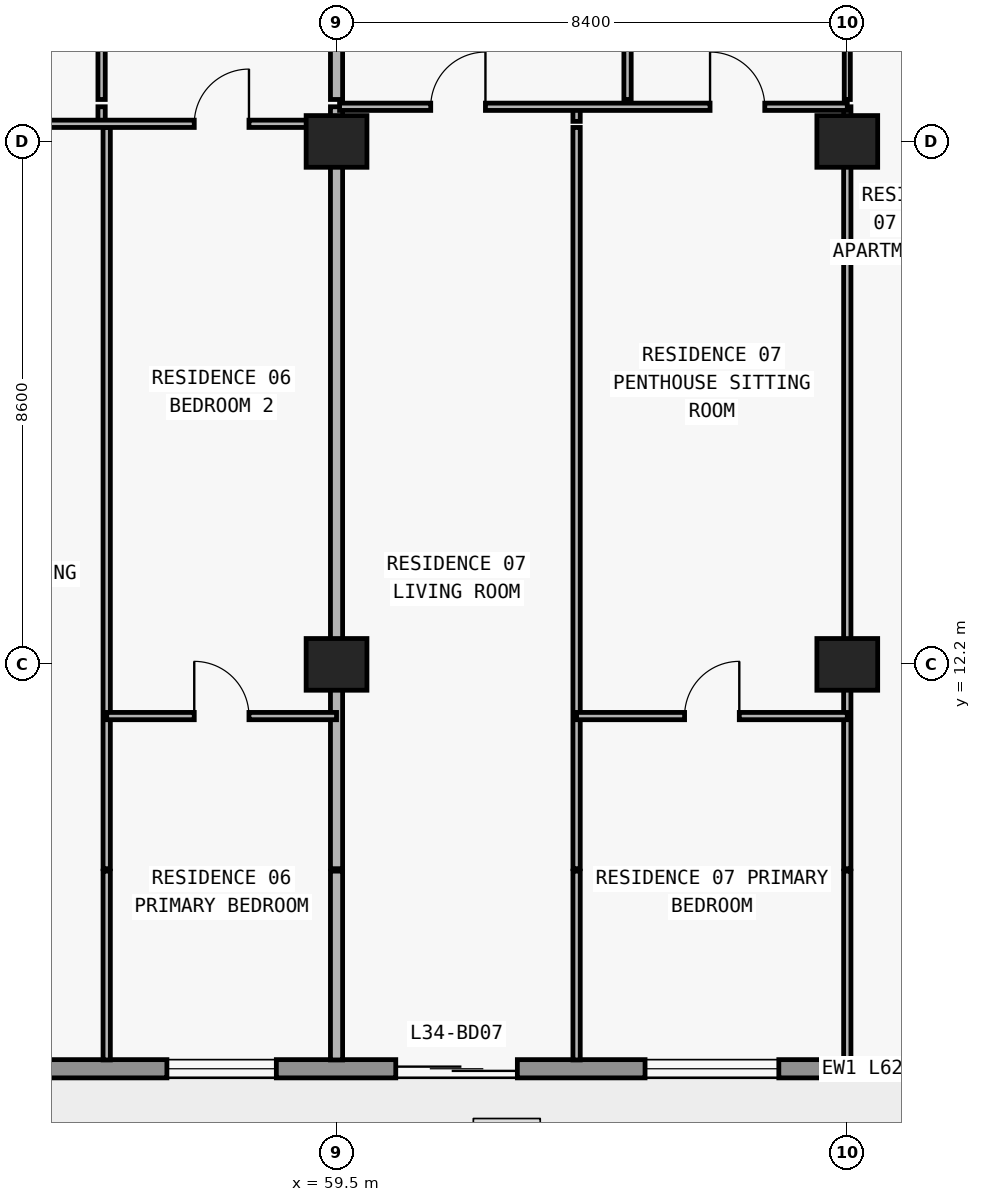
"""IFC4 building model, lengths in metres.
Left out: names, types, materials, properties, quantities, classifications, styles, units other than length and angle.
Written with IfcOpenShell. Run it as: python <this file> out.ifc"""

import sys

from ifc_helpers import new_model, si_unit, direction, frame, frame_2d, origin, origin_2d, place, context, subcontext, project, spatial, rectangle, extrude, element, fill, save


model = new_model("IFC4")
c1 = context("Model", 3, precision=1e-05, world=origin(), true_north=direction((0.0, 1.0)))
c2 = subcontext(c1, "Body", "Model", "MODEL_VIEW")
j1 = project(units=[si_unit("LENGTHUNIT", "METRE"), si_unit("PLANEANGLEUNIT", "RADIAN")], contexts=[c1])
p1 = place(None, origin())
s1 = spatial("IfcSite", under=j1, at=p1, CompositionType="ELEMENT")
p2 = place(p1, origin())
s2 = spatial("IfcBuilding", under=s1, at=p2, CompositionType="ELEMENT")
p3 = place(p2, frame((0.0, 0.0, 125.7)))
s3 = spatial("IfcBuildingStorey", under=s2, at=p3, CompositionType="ELEMENT", Elevation=125.7)
for number, where, z_axis, x_axis in (
    (1, (59.5, 12.2, 0.0), (0.0, 0.0, 1.0), (1.0, 0.0, 0.0)),
    (2, (67.9, 12.2, 0.0), (0.0, 0.0, 1.0), (1.0, 0.0, 0.0)),
    (3, (59.5, 20.8, 0.0), (0.0, 0.0, 1.0), (1.0, 0.0, 0.0)),
    (4, (67.9, 20.8, 0.0), (0.0, 0.0, 1.0), (1.0, 0.0, 0.0)),
):
    element("IfcColumn", number, at=place(p3, frame(where, z_axis=z_axis, x_axis=x_axis)), inside=s3, PredefinedType="COLUMN", context=c2, shape_type="SweptSolid", body=[
        extrude(rectangle(XDim=1.0, YDim=0.85, at=origin_2d()), origin(), (0.0, 0.0, 1.0), 3.05),
    ])
p4 = place(p3, frame((70.1, 5.55, 0.0), z_axis=(0.0, 0.0, 1.0), x_axis=(-1.0, 0.0, 0.0)))
e5 = element("IfcWall", 5, at=p4, inside=s3, PredefinedType="STANDARD", context=c2, shape_type="SweptSolid", body=[
    extrude(rectangle(XDim=62.4, YDim=0.3, at=frame_2d((31.2, 0.0))), origin(), (0.0, 0.0, 1.0), 3.05),
])
p5 = place(p4, frame((57.226, 0.0, 0.0)))
e6 = element("IfcOpeningElement", 6, at=p5, cuts=e5, PredefinedType="OPENING", context=c2, shape_type="SweptSolid", body=[
    extrude(rectangle(XDim=2.0, YDim=2.3, at=frame_2d((1.0, 1.15))), frame((0.0, 0.16, 0.0), z_axis=(0.0, -1.0, 0.0), x_axis=(1.0, 0.0, 0.0)), (0.0, 0.0, 1.0), 0.32),
])
p6 = place(p4, frame((52.926, 0.0, 0.85)))
e7 = element("IfcOpeningElement", 7, at=p6, cuts=e5, PredefinedType="OPENING", context=c2, shape_type="SweptSolid", body=[
    extrude(rectangle(XDim=2.2, YDim=1.55, at=frame_2d((1.1, 0.775))), frame((0.0, 0.16, 0.0), z_axis=(0.0, -1.0, 0.0), x_axis=(1.0, 0.0, 0.0)), (0.0, 0.0, 1.0), 0.32),
])
p7 = place(p4, frame((48.49, 0.0, 0.0)))
e8 = element("IfcOpeningElement", 8, at=p7, cuts=e5, PredefinedType="OPENING", context=c2, shape_type="SweptSolid", body=[
    extrude(rectangle(XDim=2.0, YDim=2.3, at=frame_2d((1.0, 1.15))), frame((0.0, 0.16, 0.0), z_axis=(0.0, -1.0, 0.0), x_axis=(1.0, 0.0, 0.0)), (0.0, 0.0, 1.0), 0.32),
])
p8 = place(p4, frame((44.39, 0.0, 0.85)))
e9 = element("IfcOpeningElement", 9, at=p8, cuts=e5, PredefinedType="OPENING", context=c2, shape_type="SweptSolid", body=[
    extrude(rectangle(XDim=1.8, YDim=1.55, at=frame_2d((0.9, 0.775))), frame((0.0, 0.16, 0.0), z_axis=(0.0, -1.0, 0.0), x_axis=(1.0, 0.0, 0.0)), (0.0, 0.0, 1.0), 0.32),
])
p9 = place(p4, frame((40.426, 0.0, 0.0)))
e10 = element("IfcOpeningElement", 10, at=p9, cuts=e5, PredefinedType="OPENING", context=c2, shape_type="SweptSolid", body=[
    extrude(rectangle(XDim=2.0, YDim=2.3, at=frame_2d((1.0, 1.15))), frame((0.0, 0.16, 0.0), z_axis=(0.0, -1.0, 0.0), x_axis=(1.0, 0.0, 0.0)), (0.0, 0.0, 1.0), 0.32),
])
p10 = place(p4, frame((36.126, 0.0, 0.85)))
e11 = element("IfcOpeningElement", 11, at=p10, cuts=e5, PredefinedType="OPENING", context=c2, shape_type="SweptSolid", body=[
    extrude(rectangle(XDim=2.2, YDim=1.55, at=frame_2d((1.1, 0.775))), frame((0.0, 0.16, 0.0), z_axis=(0.0, -1.0, 0.0), x_axis=(1.0, 0.0, 0.0)), (0.0, 0.0, 1.0), 0.32),
])
p11 = place(p4, frame((31.91, 0.0, 0.0)))
e12 = element("IfcOpeningElement", 12, at=p11, cuts=e5, PredefinedType="OPENING", context=c2, shape_type="SweptSolid", body=[
    extrude(rectangle(XDim=2.0, YDim=2.3, at=frame_2d((1.0, 1.15))), frame((0.0, 0.16, 0.0), z_axis=(0.0, -1.0, 0.0), x_axis=(1.0, 0.0, 0.0)), (0.0, 0.0, 1.0), 0.32),
])
p12 = place(p4, frame((28.21, 0.0, 0.85)))
e13 = element("IfcOpeningElement", 13, at=p12, cuts=e5, PredefinedType="OPENING", context=c2, shape_type="SweptSolid", body=[
    extrude(rectangle(XDim=1.8, YDim=1.55, at=frame_2d((0.9, 0.775))), frame((0.0, 0.16, 0.0), z_axis=(0.0, -1.0, 0.0), x_axis=(1.0, 0.0, 0.0)), (0.0, 0.0, 1.0), 0.32),
])
p13 = place(p4, frame((24.426, 0.0, 0.0)))
e14 = element("IfcOpeningElement", 14, at=p13, cuts=e5, PredefinedType="OPENING", context=c2, shape_type="SweptSolid", body=[
    extrude(rectangle(XDim=2.0, YDim=2.3, at=frame_2d((1.0, 1.15))), frame((0.0, 0.16, 0.0), z_axis=(0.0, -1.0, 0.0), x_axis=(1.0, 0.0, 0.0)), (0.0, 0.0, 1.0), 0.32),
])
p14 = place(p4, frame((20.126, 0.0, 0.85)))
e15 = element("IfcOpeningElement", 15, at=p14, cuts=e5, PredefinedType="OPENING", context=c2, shape_type="SweptSolid", body=[
    extrude(rectangle(XDim=2.2, YDim=1.55, at=frame_2d((1.1, 0.775))), frame((0.0, 0.16, 0.0), z_axis=(0.0, -1.0, 0.0), x_axis=(1.0, 0.0, 0.0)), (0.0, 0.0, 1.0), 0.32),
])
p15 = place(p4, frame((15.69, 0.0, 0.0)))
e16 = element("IfcOpeningElement", 16, at=p15, cuts=e5, PredefinedType="OPENING", context=c2, shape_type="SweptSolid", body=[
    extrude(rectangle(XDim=2.0, YDim=2.3, at=frame_2d((1.0, 1.15))), frame((0.0, 0.16, 0.0), z_axis=(0.0, -1.0, 0.0), x_axis=(1.0, 0.0, 0.0)), (0.0, 0.0, 1.0), 0.32),
])
p16 = place(p4, frame((11.59, 0.0, 0.85)))
e17 = element("IfcOpeningElement", 17, at=p16, cuts=e5, PredefinedType="OPENING", context=c2, shape_type="SweptSolid", body=[
    extrude(rectangle(XDim=1.8, YDim=1.55, at=frame_2d((0.9, 0.775))), frame((0.0, 0.16, 0.0), z_axis=(0.0, -1.0, 0.0), x_axis=(1.0, 0.0, 0.0)), (0.0, 0.0, 1.0), 0.32),
])
p17 = place(p4, frame((7.626, 0.0, 0.0)))
e18 = element("IfcOpeningElement", 18, at=p17, cuts=e5, PredefinedType="OPENING", context=c2, shape_type="SweptSolid", body=[
    extrude(rectangle(XDim=2.0, YDim=2.3, at=frame_2d((1.0, 1.15))), frame((0.0, 0.16, 0.0), z_axis=(0.0, -1.0, 0.0), x_axis=(1.0, 0.0, 0.0)), (0.0, 0.0, 1.0), 0.32),
])
p18 = place(p4, frame((3.326, 0.0, 0.85)))
e19 = element("IfcOpeningElement", 19, at=p18, cuts=e5, PredefinedType="OPENING", context=c2, shape_type="SweptSolid", body=[
    extrude(rectangle(XDim=2.2, YDim=1.55, at=frame_2d((1.1, 0.775))), frame((0.0, 0.16, 0.0), z_axis=(0.0, -1.0, 0.0), x_axis=(1.0, 0.0, 0.0)), (0.0, 0.0, 1.0), 0.32),
])
p19 = place(p3, frame((55.636, 21.13, 0.0), z_axis=(0.0, 0.0, 1.0), x_axis=(0.0, 1.0, 0.0)))
e20 = element("IfcWall", 20, at=p19, inside=s3, PredefinedType="PARTITIONING", context=c2, shape_type="SweptSolid", body=[
    extrude(rectangle(XDim=0.24, YDim=0.12, at=frame_2d((0.12, 0.0))), origin(), (0.0, 0.0, 1.0), 3.05),
])
p20 = place(p3, frame((55.636, 21.49, 0.0), z_axis=(0.0, 0.0, 1.0), x_axis=(0.0, 1.0, 0.0)))
e21 = element("IfcWall", 21, at=p20, inside=s3, PredefinedType="PARTITIONING", context=c2, shape_type="SweptSolid", body=[
    extrude(rectangle(XDim=4.69, YDim=0.12, at=frame_2d((2.345, 0.0))), origin(), (0.0, 0.0, 1.0), 3.05),
])
p21 = place(p20, frame((1.895, 0.0, 0.0)))
e22 = element("IfcOpeningElement", 22, at=p21, cuts=e21, PredefinedType="OPENING", context=c2, shape_type="SweptSolid", body=[
    extrude(rectangle(XDim=0.9, YDim=2.15, at=frame_2d((0.45, 1.075))), frame((0.0, 0.07, 0.0), z_axis=(0.0, -1.0, 0.0), x_axis=(1.0, 0.0, 0.0)), (0.0, 0.0, 1.0), 0.14),
])
p22 = place(p3, frame((55.72, 5.695, 0.0), z_axis=(0.0, 0.0, 1.0), x_axis=(0.0, 1.0, 0.0)))
e23 = element("IfcWall", 23, at=p22, inside=s3, PredefinedType="PARTITIONING", context=c2, shape_type="SweptSolid", body=[
    extrude(rectangle(XDim=3.105, YDim=0.12, at=frame_2d((1.552, 0.0))), origin(), (0.0, 0.0, 1.0), 3.05),
])
p23 = place(p3, frame((55.72, 8.84, 0.0), z_axis=(0.0, 0.0, 1.0), x_axis=(0.0, 1.0, 0.0)))
e24 = element("IfcWall", 24, at=p23, inside=s3, PredefinedType="PARTITIONING", context=c2, shape_type="SweptSolid", body=[
    extrude(rectangle(XDim=12.19, YDim=0.12, at=frame_2d((6.095, 0.0))), origin(), (0.0, 0.0, 1.0), 3.05),
])
p24 = place(p3, frame((59.5, 5.695, 0.0), z_axis=(0.0, 0.0, 1.0), x_axis=(0.0, 1.0, 0.0)))
e25 = element("IfcWall", 25, at=p24, inside=s3, PredefinedType="PARTITIONING", context=c2, shape_type="SweptSolid", body=[
    extrude(rectangle(XDim=3.105, YDim=0.2, at=frame_2d((1.552, 0.0))), origin(), (0.0, 0.0, 1.0), 3.05),
])
p25 = place(p3, frame((59.5, 8.84, 0.0), z_axis=(0.0, 0.0, 1.0), x_axis=(0.0, 1.0, 0.0)))
e26 = element("IfcWall", 26, at=p25, inside=s3, PredefinedType="PARTITIONING", context=c2, shape_type="SweptSolid", body=[
    extrude(rectangle(XDim=12.19, YDim=0.2, at=frame_2d((6.095, 0.0))), origin(), (0.0, 0.0, 1.0), 2.174),
])
p26 = place(p3, frame((59.5, 21.13, 0.0), z_axis=(0.0, 0.0, 1.0), x_axis=(0.0, 1.0, 0.0)))
e27 = element("IfcWall", 27, at=p26, inside=s3, PredefinedType="PARTITIONING", context=c2, shape_type="SweptSolid", body=[
    extrude(rectangle(XDim=0.24, YDim=0.2, at=frame_2d((0.12, 0.0))), origin(), (0.0, 0.0, 1.0), 2.174),
])
p27 = place(p3, frame((59.5, 21.49, 0.0), z_axis=(0.0, 0.0, 1.0), x_axis=(0.0, 1.0, 0.0)))
e28 = element("IfcWall", 28, at=p27, inside=s3, PredefinedType="PARTITIONING", context=c2, shape_type="SweptSolid", body=[
    extrude(rectangle(XDim=4.69, YDim=0.2, at=frame_2d((2.345, 0.0))), origin(), (0.0, 0.0, 1.0), 2.174),
])
p28 = place(p3, frame((63.448, 5.695, 0.0), z_axis=(0.0, 0.0, 1.0), x_axis=(0.0, 1.0, 0.0)))
e29 = element("IfcWall", 29, at=p28, inside=s3, PredefinedType="PARTITIONING", context=c2, shape_type="SweptSolid", body=[
    extrude(rectangle(XDim=3.105, YDim=0.12, at=frame_2d((1.552, 0.0))), origin(), (0.0, 0.0, 1.0), 3.05),
])
p29 = place(p3, frame((63.448, 8.84, 0.0), z_axis=(0.0, 0.0, 1.0), x_axis=(0.0, 1.0, 0.0)))
e30 = element("IfcWall", 30, at=p29, inside=s3, PredefinedType="PARTITIONING", context=c2, shape_type="SweptSolid", body=[
    extrude(rectangle(XDim=12.19, YDim=0.12, at=frame_2d((6.095, 0.0))), origin(), (0.0, 0.0, 1.0), 3.05),
])
p30 = place(p3, frame((63.448, 21.13, 0.0), z_axis=(0.0, 0.0, 1.0), x_axis=(0.0, 1.0, 0.0)))
e31 = element("IfcWall", 31, at=p30, inside=s3, PredefinedType="PARTITIONING", context=c2, shape_type="SweptSolid", body=[
    extrude(rectangle(XDim=0.24, YDim=0.12, at=frame_2d((0.12, 0.0))), origin(), (0.0, 0.0, 1.0), 3.05),
])
p31 = place(p3, frame((64.286, 21.49, 0.0), z_axis=(0.0, 0.0, 1.0), x_axis=(0.0, 1.0, 0.0)))
e32 = element("IfcWall", 32, at=p31, inside=s3, PredefinedType="PARTITIONING", context=c2, shape_type="SweptSolid", body=[
    extrude(rectangle(XDim=4.69, YDim=0.12, at=frame_2d((2.345, 0.0))), origin(), (0.0, 0.0, 1.0), 3.05),
])
p32 = place(p31, frame((1.895, 0.0, 0.0)))
e33 = element("IfcOpeningElement", 33, at=p32, cuts=e32, PredefinedType="OPENING", context=c2, shape_type="SweptSolid", body=[
    extrude(rectangle(XDim=0.9, YDim=2.15, at=frame_2d((0.45, 1.075))), frame((0.0, 0.07, 0.0), z_axis=(0.0, -1.0, 0.0), x_axis=(1.0, 0.0, 0.0)), (0.0, 0.0, 1.0), 0.14),
])
p33 = place(p3, frame((67.9, 5.695, 0.0), z_axis=(0.0, 0.0, 1.0), x_axis=(0.0, 1.0, 0.0)))
e34 = element("IfcWall", 34, at=p33, inside=s3, PredefinedType="PARTITIONING", context=c2, shape_type="SweptSolid", body=[
    extrude(rectangle(XDim=3.105, YDim=0.12, at=frame_2d((1.552, 0.0))), origin(), (0.0, 0.0, 1.0), 3.05),
])
p34 = place(p3, frame((67.9, 8.84, 0.0), z_axis=(0.0, 0.0, 1.0), x_axis=(0.0, 1.0, 0.0)))
e35 = element("IfcWall", 35, at=p34, inside=s3, PredefinedType="PARTITIONING", context=c2, shape_type="SweptSolid", body=[
    extrude(rectangle(XDim=12.19, YDim=0.12, at=frame_2d((6.095, 0.0))), origin(), (0.0, 0.0, 1.0), 2.174),
])
p35 = place(p3, frame((67.9, 21.13, 0.0), z_axis=(0.0, 0.0, 1.0), x_axis=(0.0, 1.0, 0.0)))
e36 = element("IfcWall", 36, at=p35, inside=s3, PredefinedType="PARTITIONING", context=c2, shape_type="SweptSolid", body=[
    extrude(rectangle(XDim=0.24, YDim=0.12, at=frame_2d((0.12, 0.0))), origin(), (0.0, 0.0, 1.0), 2.174),
])
p36 = place(p3, frame((67.9, 21.49, 0.0), z_axis=(0.0, 0.0, 1.0), x_axis=(0.0, 1.0, 0.0)))
e37 = element("IfcWall", 37, at=p36, inside=s3, PredefinedType="MOVABLE", context=c2, shape_type="SweptSolid", body=[
    extrude(rectangle(XDim=4.69, YDim=0.1, at=frame_2d((2.345, 0.0))), origin(), (0.0, 0.0, 1.0), 2.174),
])
p37 = place(p36, frame((1.895, 0.0, 0.0)))
e38 = element("IfcOpeningElement", 38, at=p37, cuts=e37, PredefinedType="OPENING", context=c2, shape_type="SweptSolid", body=[
    extrude(rectangle(XDim=0.9, YDim=2.124, at=frame_2d((0.45, 1.062))), frame((0.0, 0.06, 0.0), z_axis=(0.0, -1.0, 0.0), x_axis=(1.0, 0.0, 0.0)), (0.0, 0.0, 1.0), 0.12),
])
p38 = place(p3, frame((55.72, 11.35, 0.0), z_axis=(0.0, 0.0, 1.0), x_axis=(1.0, 0.0, 0.0)))
e39 = element("IfcWall", 39, at=p38, inside=s3, PredefinedType="PARTITIONING", context=c2, shape_type="SweptSolid", body=[
    extrude(rectangle(XDim=3.78, YDim=0.12, at=frame_2d((1.89, 0.0))), origin(), (0.0, 0.0, 1.0), 3.05),
])
p39 = place(p38, frame((1.44, 0.0, 0.0)))
e40 = element("IfcOpeningElement", 40, at=p39, cuts=e39, PredefinedType="OPENING", context=c2, shape_type="SweptSolid", body=[
    extrude(rectangle(XDim=0.9, YDim=2.15, at=frame_2d((0.45, 1.075))), frame((0.0, 0.07, 0.0), z_axis=(0.0, -1.0, 0.0), x_axis=(1.0, 0.0, 0.0)), (0.0, 0.0, 1.0), 0.14),
])
p40 = place(p3, frame((63.448, 11.35, 0.0), z_axis=(0.0, 0.0, 1.0), x_axis=(1.0, 0.0, 0.0)))
e41 = element("IfcWall", 41, at=p40, inside=s3, PredefinedType="PARTITIONING", context=c2, shape_type="SweptSolid", body=[
    extrude(rectangle(XDim=4.452, YDim=0.12, at=frame_2d((2.226, 0.0))), origin(), (0.0, 0.0, 1.0), 3.05),
])
p41 = place(p40, frame((1.776, 0.0, 0.0)))
e42 = element("IfcOpeningElement", 42, at=p41, cuts=e41, PredefinedType="OPENING", context=c2, shape_type="SweptSolid", body=[
    extrude(rectangle(XDim=0.9, YDim=2.15, at=frame_2d((0.45, 1.075))), frame((0.0, 0.07, 0.0), z_axis=(0.0, -1.0, 0.0), x_axis=(1.0, 0.0, 0.0)), (0.0, 0.0, 1.0), 0.14),
])
p42 = place(p3, frame((51.32, 21.09, 0.0), z_axis=(0.0, 0.0, 1.0), x_axis=(1.0, 0.0, 0.0)))
e43 = element("IfcWall", 43, at=p42, inside=s3, PredefinedType="PARTITIONING", context=c2, shape_type="SweptSolid", body=[
    extrude(rectangle(XDim=8.18, YDim=0.12, at=frame_2d((4.09, 0.0))), origin(), (0.0, 0.0, 1.0), 2.174),
])
p43 = place(p42, frame((1.708, 0.0, 0.0)))
e44 = element("IfcOpeningElement", 44, at=p43, cuts=e43, PredefinedType="OPENING", context=c2, shape_type="SweptSolid", body=[
    extrude(rectangle(XDim=0.9, YDim=2.124, at=frame_2d((0.45, 1.062))), frame((0.0, 0.07, 0.0), z_axis=(0.0, -1.0, 0.0), x_axis=(1.0, 0.0, 0.0)), (0.0, 0.0, 1.0), 0.14),
])
p44 = place(p42, frame((5.84, 0.0, 0.0)))
e45 = element("IfcOpeningElement", 45, at=p44, cuts=e43, PredefinedType="OPENING", context=c2, shape_type="SweptSolid", body=[
    extrude(rectangle(XDim=0.9, YDim=2.124, at=frame_2d((0.45, 1.062))), frame((0.0, 0.07, 0.0), z_axis=(0.0, -1.0, 0.0), x_axis=(1.0, 0.0, 0.0)), (0.0, 0.0, 1.0), 0.14),
])
p45 = place(p3, frame((59.55, 21.37, 0.0), z_axis=(0.0, 0.0, 1.0), x_axis=(1.0, 0.0, 0.0)))
e46 = element("IfcWall", 46, at=p45, inside=s3, PredefinedType="PARTITIONING", context=c2, shape_type="SweptSolid", body=[
    extrude(rectangle(XDim=8.35, YDim=0.12, at=frame_2d((4.175, 0.0))), origin(), (0.0, 0.0, 1.0), 3.05),
])
p46 = place(p45, frame((1.499, 0.0, 0.0)))
e47 = element("IfcOpeningElement", 47, at=p46, cuts=e46, PredefinedType="OPENING", context=c2, shape_type="SweptSolid", body=[
    extrude(rectangle(XDim=0.9, YDim=2.15, at=frame_2d((0.45, 1.075))), frame((0.0, 0.07, 0.0), z_axis=(0.0, -1.0, 0.0), x_axis=(1.0, 0.0, 0.0)), (0.0, 0.0, 1.0), 0.14),
])
p47 = place(p45, frame((6.093, 0.0, 0.0)))
e48 = element("IfcOpeningElement", 48, at=p47, cuts=e46, PredefinedType="OPENING", context=c2, shape_type="SweptSolid", body=[
    extrude(rectangle(XDim=0.9, YDim=2.15, at=frame_2d((0.45, 1.075))), frame((0.0, 0.07, 0.0), z_axis=(0.0, -1.0, 0.0), x_axis=(1.0, 0.0, 0.0)), (0.0, 0.0, 1.0), 0.14),
])
p48 = place(p16, origin())
e49 = element("IfcWindow", 49, at=p48, inside=s3, PartitioningType="SINGLE_PANEL", PredefinedType="WINDOW", context=c2, shape_type="SweptSolid", body=[
    extrude(rectangle(XDim=1.8, YDim=1.55, at=frame_2d((0.9, 0.775))), frame((0.0, 0.03, 0.0), z_axis=(0.0, -1.0, 0.0), x_axis=(1.0, 0.0, 0.0)), (0.0, 0.0, 1.0), 0.06),
])
fill(e17, e49)
p49 = place(p17, origin())
e50 = element("IfcDoor", 50, at=p49, inside=s3, OperationType="DOUBLE_DOOR_SLIDING", PredefinedType="DOOR", context=c2, shape_type="SweptSolid", body=[
    extrude(rectangle(XDim=2.0, YDim=2.3, at=frame_2d((1.0, 1.15))), frame((0.0, 0.025, 0.0), z_axis=(0.0, -1.0, 0.0), x_axis=(1.0, 0.0, 0.0)), (0.0, 0.0, 1.0), 0.05),
])
fill(e18, e50)
p50 = place(p18, origin())
e51 = element("IfcWindow", 51, at=p50, inside=s3, PartitioningType="SINGLE_PANEL", PredefinedType="WINDOW", context=c2, shape_type="SweptSolid", body=[
    extrude(rectangle(XDim=2.2, YDim=1.55, at=frame_2d((1.1, 0.775))), frame((0.0, 0.03, 0.0), z_axis=(0.0, -1.0, 0.0), x_axis=(1.0, 0.0, 0.0)), (0.0, 0.0, 1.0), 0.06),
])
fill(e19, e51)
p51 = place(p44, origin())
e52 = element("IfcDoor", 52, at=p51, inside=s3, OperationType="SINGLE_SWING_RIGHT", PredefinedType="DOOR", context=c2, shape_type="SweptSolid", body=[
    extrude(rectangle(XDim=0.9, YDim=2.124, at=frame_2d((0.45, 1.062))), frame((0.0, 0.025, 0.0), z_axis=(0.0, -1.0, 0.0), x_axis=(1.0, 0.0, 0.0)), (0.0, 0.0, 1.0), 0.05),
])
fill(e45, e52)
p52 = place(p39, origin())
e53 = element("IfcDoor", 53, at=p52, inside=s3, OperationType="SINGLE_SWING_LEFT", PredefinedType="DOOR", context=c2, shape_type="SweptSolid", body=[
    extrude(rectangle(XDim=0.9, YDim=2.15, at=frame_2d((0.45, 1.075))), frame((0.0, 0.025, 0.0), z_axis=(0.0, -1.0, 0.0), x_axis=(1.0, 0.0, 0.0)), (0.0, 0.0, 1.0), 0.05),
])
fill(e40, e53)
p53 = place(p46, origin())
e54 = element("IfcDoor", 54, at=p53, inside=s3, OperationType="SINGLE_SWING_RIGHT", PredefinedType="DOOR", context=c2, shape_type="SweptSolid", body=[
    extrude(rectangle(XDim=0.9, YDim=2.15, at=frame_2d((0.45, 1.075))), frame((0.0, 0.025, 0.0), z_axis=(0.0, -1.0, 0.0), x_axis=(1.0, 0.0, 0.0)), (0.0, 0.0, 1.0), 0.05),
])
fill(e47, e54)
p54 = place(p47, origin())
e55 = element("IfcDoor", 55, at=p54, inside=s3, OperationType="SINGLE_SWING_LEFT", PredefinedType="DOOR", context=c2, shape_type="SweptSolid", body=[
    extrude(rectangle(XDim=0.9, YDim=2.15, at=frame_2d((0.45, 1.075))), frame((0.0, 0.025, 0.0), z_axis=(0.0, -1.0, 0.0), x_axis=(1.0, 0.0, 0.0)), (0.0, 0.0, 1.0), 0.05),
])
fill(e48, e55)
p55 = place(p41, origin())
e56 = element("IfcDoor", 56, at=p55, inside=s3, OperationType="SINGLE_SWING_RIGHT", PredefinedType="DOOR", context=c2, shape_type="SweptSolid", body=[
    extrude(rectangle(XDim=0.9, YDim=2.15, at=frame_2d((0.45, 1.075))), frame((0.0, 0.025, 0.0), z_axis=(0.0, -1.0, 0.0), x_axis=(1.0, 0.0, 0.0)), (0.0, 0.0, 1.0), 0.05),
])
fill(e42, e56)
save(model, sys.argv[1])
